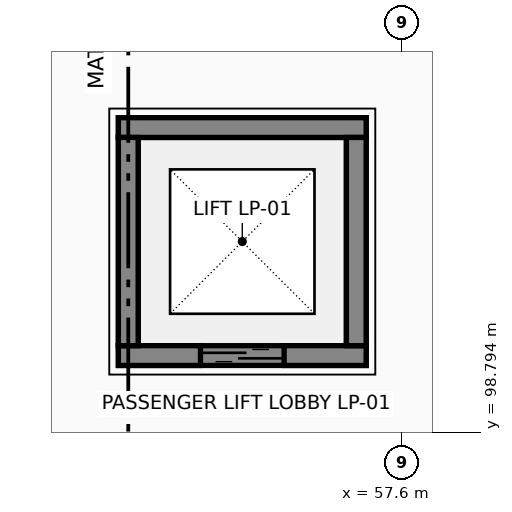
"""IFC4 building model, lengths in metres.
Left out: names, types, materials, properties, quantities, classifications, styles, units other than length and angle.
Written with IfcOpenShell. Run it as: python <this file> out.ifc"""

import sys

from ifc_helpers import new_model, si_unit, direction, frame, frame_2d, origin, place, context, subcontext, project, spatial, rectangle, extrude, element, fill, save


model = new_model("IFC4")
c1 = context("Model", 3, precision=1e-05, world=origin(), true_north=direction((0.0, 1.0)))
c2 = subcontext(c1, "Body", "Model", "MODEL_VIEW")
j1 = project(units=[si_unit("LENGTHUNIT", "METRE"), si_unit("PLANEANGLEUNIT", "RADIAN")], contexts=[c1])
p1 = place(None, origin())
s1 = spatial("IfcSite", under=j1, at=p1, CompositionType="ELEMENT")
p2 = place(p1, origin())
s2 = spatial("IfcBuilding", under=s1, at=p2, CompositionType="ELEMENT")
p3 = place(p2, frame((0.0, 0.0, -4.8)))
s3 = spatial("IfcBuildingStorey", under=s2, at=p3, CompositionType="ELEMENT", Elevation=-4.8)
for number, where, z_axis, x_axis in (
    (1, (53.87, 99.8, -1.5), (0.0, 0.0, 1.0), (1.0, 0.0, 0.0)),
    (2, (53.87, 102.8, -1.5), (0.0, 0.0, 1.0), (1.0, 0.0, 0.0)),
):
    element("IfcWall", number, at=place(p3, frame(where, z_axis=z_axis, x_axis=x_axis)), inside=s3, PredefinedType="SHEAR", context=c2, shape_type="SweptSolid", body=[
        extrude(rectangle(XDim=3.26, YDim=0.26, at=frame_2d((1.63, 0.0))), origin(), (0.0, 0.0, 1.0), 1.5),
    ])
for number, where, z_axis, x_axis in (
    (3, (54.0, 99.93, -1.5), (0.0, 0.0, 1.0), (0.0, 1.0, 0.0)),
    (4, (57.0, 99.93, -1.5), (0.0, 0.0, 1.0), (0.0, 1.0, 0.0)),
):
    element("IfcWall", number, at=place(p3, frame(where, z_axis=z_axis, x_axis=x_axis)), inside=s3, PredefinedType="SHEAR", context=c2, shape_type="SweptSolid", body=[
        extrude(rectangle(XDim=2.74, YDim=0.26, at=frame_2d((1.37, 0.0))), origin(), (0.0, 0.0, 1.0), 1.5),
    ])
p4 = place(p3, frame((53.87, 99.8, 0.0), z_axis=(0.0, 0.0, 1.0), x_axis=(1.0, 0.0, 0.0)))
e5 = element("IfcWall", 5, at=p4, inside=s3, PredefinedType="SHEAR", context=c2, shape_type="SweptSolid", body=[
    extrude(rectangle(XDim=3.26, YDim=0.26, at=frame_2d((1.63, 0.0))), origin(), (0.0, 0.0, 1.0), 4.55),
])
p5 = place(p4, frame((1.08, 0.0, 0.0)))
e6 = element("IfcOpeningElement", 6, at=p5, cuts=e5, PredefinedType="OPENING", context=c2, shape_type="SweptSolid", body=[
    extrude(rectangle(XDim=1.1, YDim=2.15, at=frame_2d((0.55, 1.075))), frame((0.0, 0.14, 0.0), z_axis=(0.0, -1.0, 0.0), x_axis=(1.0, 0.0, 0.0)), (0.0, 0.0, 1.0), 0.28),
])
p6 = place(p3, frame((53.87, 102.8, 0.0), z_axis=(0.0, 0.0, 1.0), x_axis=(1.0, 0.0, 0.0)))
e7 = element("IfcWall", 7, at=p6, inside=s3, PredefinedType="SHEAR", context=c2, shape_type="SweptSolid", body=[
    extrude(rectangle(XDim=3.26, YDim=0.26, at=frame_2d((1.63, 0.0))), origin(), (0.0, 0.0, 1.0), 4.55),
])
for number, where, z_axis, x_axis in (
    (8, (54.0, 99.93, 0.0), (0.0, 0.0, 1.0), (0.0, 1.0, 0.0)),
    (9, (57.0, 99.93, 0.0), (0.0, 0.0, 1.0), (0.0, 1.0, 0.0)),
):
    element("IfcWall", number, at=place(p3, frame(where, z_axis=z_axis, x_axis=x_axis)), inside=s3, PredefinedType="SHEAR", context=c2, shape_type="SweptSolid", body=[
        extrude(rectangle(XDim=2.74, YDim=0.26, at=frame_2d((1.37, 0.0))), origin(), (0.0, 0.0, 1.0), 4.55),
    ])
p7 = place(p5, origin())
e10 = element("IfcDoor", 10, at=p7, inside=s3, OperationType="DOUBLE_DOOR_SLIDING", PredefinedType="DOOR", context=c2, shape_type="SweptSolid", body=[
    extrude(rectangle(XDim=1.1, YDim=2.15, at=frame_2d((0.55, 1.075))), frame((0.0, 0.025, 0.0), z_axis=(0.0, -1.0, 0.0), x_axis=(1.0, 0.0, 0.0)), (0.0, 0.0, 1.0), 0.05),
])
fill(e6, e10)
save(model, sys.argv[1])
